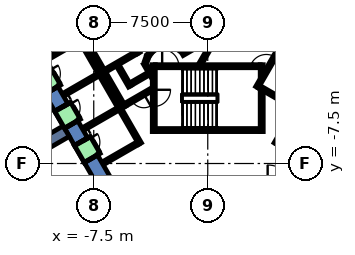
"""IFC4 building model, lengths in metres.
Left out: names, types, materials, properties, quantities, classifications, styles, units other than length and angle.
Written with IfcOpenShell. Run it as: python <this file> out.ifc"""

import sys

from ifc_helpers import new_model, si_unit, direction, frame, frame_2d, origin, place, context, subcontext, project, spatial, polyline, rectangle, outline, extrude, element, fill, save


model = new_model("IFC4")
c1 = context("Model", 3, precision=1e-05, world=origin(), true_north=direction((0.0, 1.0)))
c2 = subcontext(c1, "Body", "Model", "MODEL_VIEW")
j1 = project(units=[si_unit("LENGTHUNIT", "METRE"), si_unit("PLANEANGLEUNIT", "RADIAN")], contexts=[c1])
p1 = place(None, origin())
s1 = spatial("IfcSite", under=j1, at=p1, CompositionType="ELEMENT")
p2 = place(p1, origin())
s2 = spatial("IfcBuilding", under=s1, at=p2, CompositionType="ELEMENT")
p3 = place(p2, origin())
s3 = spatial("IfcBuildingStorey", under=s2, at=p3, CompositionType="ELEMENT", Elevation=0.0)
p4 = place(p3, frame((0.0, 0.0, -0.5)))
e1 = element("IfcWall", 1, at=p4, inside=s3, PredefinedType="SHEAR", context=c2, shape_type="SweptSolid", body=[
    extrude(outline(polyline([(-10.067, -4.063), (-9.201, -3.563), (-9.851, -2.437), (-10.717, -2.937), (-10.067, -4.063)])), origin(), (0.0, 0.0, 1.0), 9.05),
])
p5 = place(p3, frame((0.0, 0.0, -0.5)))
e2 = element("IfcWall", 2, at=p5, inside=s3, PredefinedType="SHEAR", context=c2, shape_type="SweptSolid", body=[
    extrude(outline(polyline([(-8.767, -6.314), (-7.902, -5.814), (-8.551, -4.689), (-9.417, -5.189), (-8.767, -6.314)])), origin(), (0.0, 0.0, 1.0), 9.05),
])
p6 = place(p3, frame((0.0, 0.0, -0.5)))
e3 = element("IfcWall", 3, at=p6, inside=s3, PredefinedType="SHEAR", context=c2, shape_type="SweptSolid", body=[
    extrude(outline(polyline([(-7.252, -6.94), (-8.117, -7.44), (-6.928, -9.5), (-6.351, -8.5), (-7.252, -6.94)])), origin(), (0.0, 0.0, 1.0), 9.05),
])
p7 = place(p3, frame((0.0, 0.0, 3.6)))
e4 = element("IfcWall", 4, at=p7, inside=s3, PredefinedType="SHEAR", context=c2, shape_type="SweptSolid", body=[
    extrude(outline(polyline([(-10.717, -2.937), (-9.851, -2.437), (-10.501, -1.311), (-11.367, -1.811), (-10.717, -2.937)])), origin(), (0.0, 0.0, 1.0), 4.95),
])
p8 = place(p3, frame((0.0, 0.0, 3.6)))
e5 = element("IfcWall", 5, at=p8, inside=s3, PredefinedType="SHEAR", context=c2, shape_type="SweptSolid", body=[
    extrude(outline(polyline([(-9.417, -5.189), (-8.551, -4.689), (-9.201, -3.563), (-10.067, -4.063), (-9.417, -5.189)])), origin(), (0.0, 0.0, 1.0), 4.95),
])
p9 = place(p3, frame((0.0, 0.0, 3.6)))
e6 = element("IfcWall", 6, at=p9, inside=s3, PredefinedType="SHEAR", context=c2, shape_type="SweptSolid", body=[
    extrude(outline(polyline([(-8.117, -7.44), (-7.252, -6.94), (-7.902, -5.814), (-8.767, -6.314), (-8.117, -7.44)])), origin(), (0.0, 0.0, 1.0), 4.95),
])
p10 = place(p3, frame((-9.31, -5.375, -0.5), z_axis=(0.0, 0.0, 1.0), x_axis=(-0.866017533419, -0.500013631625, 0.0)))
e7 = element("IfcWall", 7, at=p10, inside=s3, PredefinedType="SHEAR", context=c2, shape_type="SweptSolid", body=[
    extrude(rectangle(XDim=9.0, YDim=0.8, at=frame_2d((4.5, 0.0))), origin(), (0.0, 0.0, 1.0), 9.05),
])
p11 = place(p3, frame((-3.9, -1.599, 0.0), z_axis=(0.0, 0.0, 1.0), x_axis=(-0.865969445389, -0.500096910261, 0.0)))
e8 = element("IfcWall", 8, at=p11, inside=s3, PredefinedType="PARTITIONING", context=c2, shape_type="SweptSolid", body=[
    extrude(rectangle(XDim=1.373, YDim=0.2, at=frame_2d((0.687, 0.0))), origin(), (0.0, 0.0, 1.0), 8.55),
])
p12 = place(p3, frame((-5.126, -2.422, 0.0), z_axis=(0.0, 0.0, 1.0), x_axis=(-0.500062241894, 0.865989465428, 0.0)))
e9 = element("IfcWall", 9, at=p12, inside=s3, PredefinedType="PARTITIONING", context=c2, shape_type="SweptSolid", body=[
    extrude(rectangle(XDim=1.7, YDim=0.2, at=frame_2d((0.85, 0.0))), origin(), (0.0, 0.0, 1.0), 8.55),
])
p13 = place(p3, frame((-5.492, -3.788, 0.0), z_axis=(0.0, 0.0, 1.0), x_axis=(-0.500008949224, 0.866020236886, 0.0)))
e10 = element("IfcWall", 10, at=p13, inside=s3, PredefinedType="PARTITIONING", context=c2, shape_type="SweptSolid", body=[
    extrude(rectangle(XDim=2.68, YDim=0.2, at=frame_2d((1.34, 0.0))), origin(), (0.0, 0.0, 1.0), 8.55),
])
p14 = place(p3, frame((-4.145, -0.92, 0.0), z_axis=(0.0, 0.0, 1.0), x_axis=(0.499743786207, -0.866173278362, 0.0)))
e11 = element("IfcWall", 11, at=p14, inside=s3, PredefinedType="PARTITIONING", context=c2, shape_type="SweptSolid", body=[
    extrude(rectangle(XDim=0.991, YDim=0.2, at=frame_2d((0.495, 0.0))), origin(), (0.0, 0.0, 1.0), 8.55),
])
p15 = place(p3, frame((-3.65, -2.61, 0.0), z_axis=(0.0, 0.0, 1.0), x_axis=(-0.866072462134, -0.499918483688, 0.0)))
e12 = element("IfcWall", 12, at=p15, inside=s3, PredefinedType="PARTITIONING", context=c2, shape_type="SweptSolid", body=[
    extrude(rectangle(XDim=2.084, YDim=0.2, at=frame_2d((1.042, 0.0))), origin(), (0.0, 0.0, 1.0), 8.55),
])
p16 = place(p15, frame((0.642, 0.0, 0.0)))
e13 = element("IfcOpeningElement", 13, at=p16, cuts=e12, PredefinedType="OPENING", context=c2, shape_type="SweptSolid", body=[
    extrude(rectangle(XDim=0.9, YDim=2.1, at=frame_2d((0.45, 1.05))), frame((0.0, 0.11, 0.0), z_axis=(0.0, -1.0, 0.0), x_axis=(1.0, 0.0, 0.0)), (0.0, 0.0, 1.0), 0.22),
])
p17 = place(p3, frame((-0.52, -1.0, 0.0), z_axis=(0.0, 0.0, 1.0), x_axis=(0.50011622646, 0.865958290007, 0.0)))
e14 = element("IfcWall", 14, at=p17, inside=s3, PredefinedType="PARTITIONING", context=c2, shape_type="SweptSolid", body=[
    extrude(rectangle(XDim=4.991, YDim=0.2, at=frame_2d((2.496, 0.0))), origin(), (0.0, 0.0, 1.0), 8.55),
])
p18 = place(p17, frame((1.945, 0.0, 0.0)))
e15 = element("IfcOpeningElement", 15, at=p18, cuts=e14, PredefinedType="OPENING", context=c2, shape_type="SweptSolid", body=[
    extrude(rectangle(XDim=1.0, YDim=2.1, at=frame_2d((0.5, 1.05))), frame((0.0, 0.11, 0.0), z_axis=(0.0, -1.0, 0.0), x_axis=(1.0, 0.0, 0.0)), (0.0, 0.0, 1.0), 0.22),
])
p19 = place(p3, frame((-0.412, 0.414, 0.0), z_axis=(0.0, 0.0, 1.0), x_axis=(-0.866017369001, -0.500013916395, 0.0)))
e16 = element("IfcWall", 16, at=p19, inside=s3, PredefinedType="PARTITIONING", context=c2, shape_type="SweptSolid", body=[
    extrude(rectangle(XDim=1.45, YDim=0.2, at=frame_2d((0.725, 0.0))), origin(), (0.0, 0.0, 1.0), 8.55),
])
p20 = place(p3, frame((-3.723, -0.131, 0.0), z_axis=(0.0, 0.0, 1.0), x_axis=(-0.594675113454, -0.803966112121, 0.0)))
e17 = element("IfcWall", 17, at=p20, inside=s3, PredefinedType="PARTITIONING", context=c2, shape_type="SweptSolid", body=[
    extrude(rectangle(XDim=0.338, YDim=0.2, at=frame_2d((0.169, 0.0))), origin(), (0.0, 0.0, 1.0), 8.55),
])
p21 = place(p3, frame((-3.96, -0.47, 0.0), z_axis=(0.0, 0.0, 1.0), x_axis=(-0.334824194261, -0.942280615813, 0.0)))
e18 = element("IfcWall", 18, at=p21, inside=s3, PredefinedType="PARTITIONING", context=c2, shape_type="SweptSolid", body=[
    extrude(rectangle(XDim=0.338, YDim=0.2, at=frame_2d((0.169, 0.0))), origin(), (0.0, 0.0, 1.0), 8.55),
])
p22 = place(p3, frame((-5.94, 2.188, 0.0), z_axis=(0.0, 0.0, 1.0), x_axis=(0.49994636267, -0.866056369097, 0.0)))
e19 = element("IfcWall", 19, at=p22, inside=s3, PredefinedType="STANDARD", context=c2, shape_type="SweptSolid", body=[
    extrude(rectangle(XDim=2.8, YDim=0.2, at=frame_2d((1.4, 0.0))), origin(), (0.0, 0.0, 1.0), 8.55),
])
p23 = place(p22, frame((1.225, 0.0, 0.0)))
e20 = element("IfcOpeningElement", 20, at=p23, cuts=e19, PredefinedType="OPENING", context=c2, shape_type="SweptSolid", body=[
    extrude(rectangle(XDim=1.1, YDim=2.1, at=frame_2d((0.55, 1.05))), frame((0.0, 0.11, 0.0), z_axis=(0.0, -1.0, 0.0), x_axis=(1.0, 0.0, 0.0)), (0.0, 0.0, 1.0), 0.22),
])
p24 = place(p3, frame((-8.192, 0.888, 0.0), z_axis=(0.0, 0.0, 1.0), x_axis=(0.49994636267, -0.866056369097, 0.0)))
e21 = element("IfcWall", 21, at=p24, inside=s3, PredefinedType="STANDARD", context=c2, shape_type="SweptSolid", body=[
    extrude(rectangle(XDim=2.8, YDim=0.2, at=frame_2d((1.4, 0.0))), origin(), (0.0, 0.0, 1.0), 8.55),
])
p25 = place(p3, frame((-4.677, -0.2, 0.0), z_axis=(0.0, 0.0, 1.0), x_axis=(-0.865973769406, -0.500089422704, 0.0)))
e22 = element("IfcWall", 22, at=p25, inside=s3, PredefinedType="STANDARD", context=c2, shape_type="SweptSolid", body=[
    extrude(rectangle(XDim=2.399, YDim=0.2, at=frame_2d((1.2, 0.0))), origin(), (0.0, 0.0, 1.0), 8.55),
])
p26 = place(p3, frame((-9.751, 2.99, 0.0), z_axis=(0.0, 0.0, 1.0), x_axis=(0.50000090737, -0.866024879913, 0.0)))
e23 = element("IfcWall", 23, at=p26, inside=s3, PredefinedType="STANDARD", context=c2, shape_type="SweptSolid", body=[
    extrude(rectangle(XDim=10.6, YDim=0.2, at=frame_2d((5.3, 0.0))), origin(), (0.0, 0.0, 1.0), 8.55),
])
for number, where, z_axis, x_axis in (
    (24, (-8.488, 0.602, 0.0), (0.0, 0.0, 1.0), (-0.866, -0.5, 0.0)),
    (25, (-7.188, -1.65, 0.0), (0.0, 0.0, 1.0), (-0.866, -0.5, 0.0)),
    (26, (-5.888, -3.902, 0.0), (0.0, 0.0, 1.0), (-0.866, -0.5, 0.0)),
    (27, (-4.588, -6.153, 0.0), (0.0, 0.0, 1.0), (-0.866, -0.5, 0.0)),
):
    element("IfcWall", number, at=place(p3, frame(where, z_axis=z_axis, x_axis=x_axis)), inside=s3, PredefinedType="STANDARD", context=c2, shape_type="SweptSolid", body=[
        extrude(rectangle(XDim=2.5, YDim=0.2, at=frame_2d((1.25, 0.0))), origin(), (0.0, 0.0, 1.0), 8.55),
    ])
p27 = place(p3, frame((3.24, -2.488, 0.0), z_axis=(0.0, 0.0, 1.0), x_axis=(0.49994636267, 0.866056369097, 0.0)))
e28 = element("IfcWall", 28, at=p27, inside=s3, PredefinedType="STANDARD", context=c2, shape_type="SweptSolid", body=[
    extrude(rectangle(XDim=2.8, YDim=0.2, at=frame_2d((1.4, 0.0))), origin(), (0.0, 0.0, 1.0), 8.55),
])
p28 = place(p27, frame((1.225, 0.0, 0.0)))
e29 = element("IfcOpeningElement", 29, at=p28, cuts=e28, PredefinedType="OPENING", context=c2, shape_type="SweptSolid", body=[
    extrude(rectangle(XDim=1.1, YDim=2.1, at=frame_2d((0.55, 1.05))), frame((0.0, 0.11, 0.0), z_axis=(0.0, -1.0, 0.0), x_axis=(1.0, 0.0, 0.0)), (0.0, 0.0, 1.0), 0.22),
])
p29 = place(p3, frame((3.377, -2.452, 0.0), z_axis=(0.0, 0.0, 1.0), x_axis=(0.865955154139, -0.50012165622, 0.0)))
e30 = element("IfcWall", 30, at=p29, inside=s3, PredefinedType="STANDARD", context=c2, shape_type="SweptSolid", body=[
    extrude(rectangle(XDim=2.4, YDim=0.2, at=frame_2d((1.2, 0.0))), origin(), (0.0, 0.0, 1.0), 8.55),
])
p30 = place(p3, frame((4.451, -6.19, 0.0), z_axis=(0.0, 0.0, 1.0), x_axis=(0.50000090737, 0.866024879913, 0.0)))
e31 = element("IfcWall", 31, at=p30, inside=s3, PredefinedType="STANDARD", context=c2, shape_type="SweptSolid", body=[
    extrude(rectangle(XDim=10.6, YDim=0.2, at=frame_2d((5.3, 0.0))), origin(), (0.0, 0.0, 1.0), 8.55),
])
p31 = place(p3, frame((-10.848, -1.511, 0.0), z_axis=(0.0, 0.0, 1.0), x_axis=(0.49989585183, -0.866085525409, 0.0)))
e32 = element("IfcWall", 32, at=p31, inside=s3, PredefinedType="STANDARD", context=c2, shape_type="SweptSolid", body=[
    extrude(rectangle(XDim=1.3, YDim=1.2, at=frame_2d((0.65, 0.0))), origin(), (0.0, 0.0, 1.0), 2.4),
])
p32 = place(p31, frame((0.1, 0.0, 0.0)))
e33 = element("IfcOpeningElement", 33, at=p32, cuts=e32, PredefinedType="OPENING", context=c2, shape_type="SweptSolid", body=[
    extrude(rectangle(XDim=1.1, YDim=2.3, at=frame_2d((0.55, 1.15))), frame((0.0, 0.61, 0.0), z_axis=(0.0, -1.0, 0.0), x_axis=(1.0, 0.0, 0.0)), (0.0, 0.0, 1.0), 1.22),
])
p33 = place(p3, frame((-9.548, -3.763, 0.0), z_axis=(0.0, 0.0, 1.0), x_axis=(0.500036693733, -0.866004217611, 0.0)))
e34 = element("IfcWall", 34, at=p33, inside=s3, PredefinedType="STANDARD", context=c2, shape_type="SweptSolid", body=[
    extrude(rectangle(XDim=1.3, YDim=1.2, at=frame_2d((0.65, 0.0))), origin(), (0.0, 0.0, 1.0), 2.4),
])
p34 = place(p33, frame((0.1, 0.0, 0.0)))
e35 = element("IfcOpeningElement", 35, at=p34, cuts=e34, PredefinedType="OPENING", context=c2, shape_type="SweptSolid", body=[
    extrude(rectangle(XDim=1.1, YDim=2.3, at=frame_2d((0.55, 1.15))), frame((0.0, 0.61, 0.0), z_axis=(0.0, -1.0, 0.0), x_axis=(1.0, 0.0, 0.0)), (0.0, 0.0, 1.0), 1.22),
])
p35 = place(p3, frame((-8.248, -6.015, 0.0), z_axis=(0.0, 0.0, 1.0), x_axis=(0.500362116554, -0.865816234728, 0.0)))
e36 = element("IfcWall", 36, at=p35, inside=s3, PredefinedType="STANDARD", context=c2, shape_type="SweptSolid", body=[
    extrude(rectangle(XDim=1.299, YDim=1.2, at=frame_2d((0.65, 0.0))), origin(), (0.0, 0.0, 1.0), 2.4),
])
p36 = place(p35, frame((0.1, 0.0, 0.0)))
e37 = element("IfcOpeningElement", 37, at=p36, cuts=e36, PredefinedType="OPENING", context=c2, shape_type="SweptSolid", body=[
    extrude(rectangle(XDim=1.1, YDim=2.3, at=frame_2d((0.55, 1.15))), frame((0.0, 0.61, 0.0), z_axis=(0.0, -1.0, 0.0), x_axis=(1.0, 0.0, 0.0)), (0.0, 0.0, 1.0), 1.22),
])
p37 = place(p3, frame((-3.55, -1.0, 0.0), z_axis=(0.0, 0.0, 1.0), x_axis=(0.0, -1.0, 0.0)))
e38 = element("IfcWall", 38, at=p37, inside=s3, PredefinedType="STANDARD", context=c2, shape_type="SweptSolid", body=[
    extrude(rectangle(XDim=4.4, YDim=0.2, at=frame_2d((2.2, 0.0))), origin(), (0.0, 0.0, 1.0), 8.55),
])
p38 = place(p37, frame((1.65, 0.0, 0.0)))
e39 = element("IfcOpeningElement", 39, at=p38, cuts=e38, PredefinedType="OPENING", context=c2, shape_type="SweptSolid", body=[
    extrude(rectangle(XDim=1.1, YDim=2.2, at=frame_2d((0.55, 1.1))), frame((0.0, 0.11, 0.0), z_axis=(0.0, -1.0, 0.0), x_axis=(1.0, 0.0, 0.0)), (0.0, 0.0, 1.0), 0.22),
])
p39 = place(p3, frame((3.55, -2.667, 0.0), z_axis=(0.0, 0.0, 1.0), x_axis=(0.0, -1.0, 0.0)))
e40 = element("IfcWall", 40, at=p39, inside=s3, PredefinedType="STANDARD", context=c2, shape_type="SweptSolid", body=[
    extrude(rectangle(XDim=2.733, YDim=0.2, at=frame_2d((1.366, 0.0))), origin(), (0.0, 0.0, 1.0), 8.55),
])
p40 = place(p3, frame((3.55, -1.0, 0.0), z_axis=(0.0, 0.0, 1.0), x_axis=(0.0, -1.0, 0.0)))
e41 = element("IfcWall", 41, at=p40, inside=s3, PredefinedType="STANDARD", context=c2, shape_type="SweptSolid", body=[
    extrude(rectangle(XDim=0.751, YDim=0.2, at=frame_2d((0.375, 0.0))), origin(), (0.0, 0.0, 1.0), 8.55),
])
p41 = place(p3, frame((-3.45, -1.1, 0.0), z_axis=(0.0, 0.0, 1.0), x_axis=(1.0, 0.0, 0.0)))
e42 = element("IfcWall", 42, at=p41, inside=s3, PredefinedType="STANDARD", context=c2, shape_type="SweptSolid", body=[
    extrude(rectangle(XDim=6.9, YDim=0.2, at=frame_2d((3.45, 0.0))), origin(), (0.0, 0.0, 1.0), 8.55),
])
p42 = place(p41, frame((0.45, 0.0, 0.0)))
e43 = element("IfcOpeningElement", 43, at=p42, cuts=e42, PredefinedType="OPENING", context=c2, shape_type="SweptSolid", body=[
    extrude(rectangle(XDim=1.1, YDim=2.2, at=frame_2d((0.55, 1.1))), frame((0.0, 0.11, 0.0), z_axis=(0.0, -1.0, 0.0), x_axis=(1.0, 0.0, 0.0)), (0.0, 0.0, 1.0), 0.22),
])
p43 = place(p3, frame((-3.45, -5.3, 0.0), z_axis=(0.0, 0.0, 1.0), x_axis=(1.0, 0.0, 0.0)))
e44 = element("IfcWall", 44, at=p43, inside=s3, PredefinedType="STANDARD", context=c2, shape_type="SweptSolid", body=[
    extrude(rectangle(XDim=6.9, YDim=0.2, at=frame_2d((3.45, 0.0))), origin(), (0.0, 0.0, 1.0), 8.55),
])
p44 = place(p16, origin())
e45 = element("IfcDoor", 45, at=p44, inside=s3, OperationType="SINGLE_SWING_LEFT", PredefinedType="DOOR", context=c2, shape_type="SweptSolid", body=[
    extrude(rectangle(XDim=0.9, YDim=2.1, at=frame_2d((0.45, 1.05))), frame((0.0, 0.025, 0.0), z_axis=(0.0, -1.0, 0.0), x_axis=(1.0, 0.0, 0.0)), (0.0, 0.0, 1.0), 0.05),
])
fill(e13, e45)
p45 = place(p34, origin())
e46 = element("IfcDoor", 46, at=p45, inside=s3, OperationType="SLIDING_TO_LEFT", PredefinedType="DOOR", context=c2, shape_type="SweptSolid", body=[
    extrude(rectangle(XDim=1.1, YDim=2.3, at=frame_2d((0.55, 1.15))), frame((0.0, 0.025, 0.0), z_axis=(0.0, -1.0, 0.0), x_axis=(1.0, 0.0, 0.0)), (0.0, 0.0, 1.0), 0.05),
])
fill(e35, e46)
p46 = place(p36, origin())
e47 = element("IfcDoor", 47, at=p46, inside=s3, OperationType="SLIDING_TO_LEFT", PredefinedType="DOOR", context=c2, shape_type="SweptSolid", body=[
    extrude(rectangle(XDim=1.1, YDim=2.3, at=frame_2d((0.55, 1.15))), frame((0.0, 0.025, 0.0), z_axis=(0.0, -1.0, 0.0), x_axis=(1.0, 0.0, 0.0)), (0.0, 0.0, 1.0), 0.05),
])
fill(e37, e47)
p47 = place(p28, origin())
e48 = element("IfcDoor", 48, at=p47, inside=s3, OperationType="SLIDING_TO_LEFT", PredefinedType="DOOR", context=c2, shape_type="SweptSolid", body=[
    extrude(rectangle(XDim=1.1, YDim=2.1, at=frame_2d((0.55, 1.05))), frame((0.0, 0.025, 0.0), z_axis=(0.0, -1.0, 0.0), x_axis=(1.0, 0.0, 0.0)), (0.0, 0.0, 1.0), 0.05),
])
fill(e29, e48)
p48 = place(p42, origin())
e49 = element("IfcDoor", 49, at=p48, inside=s3, OperationType="SINGLE_SWING_LEFT", PredefinedType="DOOR", context=c2, shape_type="SweptSolid", body=[
    extrude(rectangle(XDim=1.1, YDim=2.2, at=frame_2d((0.55, 1.1))), frame((0.0, 0.025, 0.0), z_axis=(0.0, -1.0, 0.0), x_axis=(1.0, 0.0, 0.0)), (0.0, 0.0, 1.0), 0.05),
])
fill(e43, e49)
p49 = place(p38, origin())
e50 = element("IfcDoor", 50, at=p49, inside=s3, OperationType="SINGLE_SWING_LEFT", PredefinedType="DOOR", context=c2, shape_type="SweptSolid", body=[
    extrude(rectangle(XDim=1.1, YDim=2.2, at=frame_2d((0.55, 1.1))), frame((0.0, 0.025, 0.0), z_axis=(0.0, -1.0, 0.0), x_axis=(1.0, 0.0, 0.0)), (0.0, 0.0, 1.0), 0.05),
])
fill(e39, e50)
save(model, sys.argv[1])
